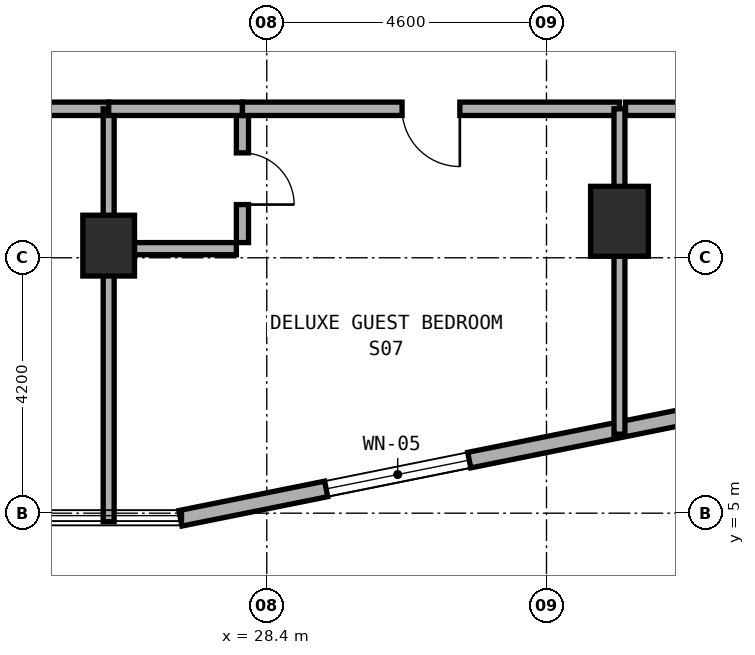
"""IFC4 building model, lengths in metres.
Left out: names, types, materials, properties, quantities, classifications, styles, units other than length and angle.
Written with IfcOpenShell. Run it as: python <this file> out.ifc"""

import sys

from ifc_helpers import new_model, si_unit, direction, frame, frame_2d, origin, origin_2d, place, context, subcontext, project, spatial, rectangle, extrude, element, fill, save


model = new_model("IFC4")
c1 = context("Model", 3, precision=1e-05, world=origin(), true_north=direction((0.0, 1.0)))
c2 = subcontext(c1, "Body", "Model", "MODEL_VIEW")
j1 = project(units=[si_unit("LENGTHUNIT", "METRE"), si_unit("PLANEANGLEUNIT", "RADIAN")], contexts=[c1])
p1 = place(None, origin())
s1 = spatial("IfcSite", under=j1, at=p1, CompositionType="ELEMENT")
p2 = place(p1, origin())
s2 = spatial("IfcBuilding", under=s1, at=p2, CompositionType="ELEMENT")
p3 = place(p2, frame((0.0, 0.0, 127.5)))
s3 = spatial("IfcBuildingStorey", under=s2, at=p3, CompositionType="ELEMENT", Elevation=127.5)
p4 = place(p3, frame((25.8, 9.4, 0.0), z_axis=(0.0, 0.0, 1.0), x_axis=(1.0, 0.0, 0.0)))
e1 = element("IfcColumn", 1, at=p4, inside=s3, PredefinedType="COLUMN", context=c2, shape_type="SweptSolid", body=[
    extrude(rectangle(XDim=0.85, YDim=1.0, at=origin_2d()), origin(), (0.0, 0.0, 1.0), 3.5),
])
p5 = place(p3, frame((34.2, 9.8, 0.0), z_axis=(0.0, 0.0, 1.0), x_axis=(1.0, 0.0, 0.0)))
e2 = element("IfcColumn", 2, at=p5, inside=s3, PredefinedType="COLUMN", context=c2, shape_type="SweptSolid", body=[
    extrude(rectangle(XDim=0.95, YDim=1.15, at=origin_2d()), origin(), (0.0, 0.0, 1.0), 3.5),
])
p6 = place(p3, frame((26.98, 4.916, 0.0), z_axis=(0.0, 0.0, 1.0), x_axis=(0.980315963543, 0.197435082048, 0.0)))
e3 = element("IfcWall", 3, at=p6, inside=s3, PredefinedType="STANDARD", context=c2, shape_type="SweptSolid", body=[
    extrude(rectangle(XDim=9.183, YDim=0.26, at=frame_2d((4.591, 0.0))), origin(), (0.0, 0.0, 1.0), 3.22),
])
p7 = place(p6, frame((2.445, 0.0, 0.8)))
e4 = element("IfcOpeningElement", 4, at=p7, cuts=e3, PredefinedType="OPENING", context=c2, shape_type="SweptSolid", body=[
    extrude(rectangle(XDim=2.4, YDim=1.6, at=frame_2d((1.2, 0.8))), frame((0.0, 0.14, 0.0), z_axis=(0.0, -1.0, 0.0), x_axis=(1.0, 0.0, 0.0)), (0.0, 0.0, 1.0), 0.28),
])
p8 = place(p3, frame((18.4, 11.65, 0.0), z_axis=(0.0, 0.0, 1.0), x_axis=(1.0, 0.0, 0.0)))
e5 = element("IfcWall", 5, at=p8, inside=s3, PredefinedType="SOLIDWALL", context=c2, shape_type="SweptSolid", body=[
    extrude(rectangle(XDim=7.4, YDim=0.22, at=frame_2d((3.7, 0.0))), origin(), (0.0, 0.0, 1.0), 2.695),
])
p9 = place(p8, frame((3.225, 0.0, 0.0)))
e6 = element("IfcOpeningElement", 6, at=p9, cuts=e5, PredefinedType="OPENING", context=c2, shape_type="SweptSolid", body=[
    extrude(rectangle(XDim=0.95, YDim=2.1, at=frame_2d((0.475, 1.05))), frame((0.0, 0.12, 0.0), z_axis=(0.0, -1.0, 0.0), x_axis=(1.0, 0.0, 0.0)), (0.0, 0.0, 1.0), 0.24),
])
p10 = place(p3, frame((25.8, 4.86, 0.0), z_axis=(0.0, 0.0, 1.0), x_axis=(0.0, 1.0, 0.0)))
e7 = element("IfcWall", 7, at=p10, inside=s3, PredefinedType="SOLIDWALL", context=c2, shape_type="SweptSolid", body=[
    extrude(rectangle(XDim=6.79, YDim=0.18, at=frame_2d((3.395, 0.0))), origin(), (0.0, 0.0, 1.0), 2.695),
])
p11 = place(p3, frame((28.0, 9.45, 0.0), z_axis=(0.0, 0.0, 1.0), x_axis=(0.0, 1.0, 0.0)))
e8 = element("IfcWall", 8, at=p11, inside=s3, PredefinedType="PLUMBINGWALL", context=c2, shape_type="SweptSolid", body=[
    extrude(rectangle(XDim=2.1, YDim=0.2, at=frame_2d((1.05, 0.0))), origin(), (0.0, 0.0, 1.0), 2.745),
])
p12 = place(p11, frame((0.625, 0.0, 0.0)))
e9 = element("IfcOpeningElement", 9, at=p12, cuts=e8, PredefinedType="OPENING", context=c2, shape_type="SweptSolid", body=[
    extrude(rectangle(XDim=0.85, YDim=2.1, at=frame_2d((0.425, 1.05))), frame((0.0, 0.11, 0.0), z_axis=(0.0, -1.0, 0.0), x_axis=(1.0, 0.0, 0.0)), (0.0, 0.0, 1.0), 0.22),
])
p13 = place(p3, frame((25.9, 9.35, 0.0), z_axis=(0.0, 0.0, 1.0), x_axis=(1.0, 0.0, 0.0)))
e10 = element("IfcWall", 10, at=p13, inside=s3, PredefinedType="PLUMBINGWALL", context=c2, shape_type="SweptSolid", body=[
    extrude(rectangle(XDim=2.0, YDim=0.2, at=frame_2d((1.0, 0.0))), origin(), (0.0, 0.0, 1.0), 2.835),
])
p14 = place(p3, frame((25.8, 11.65, 0.0), z_axis=(0.0, 0.0, 1.0), x_axis=(1.0, 0.0, 0.0)))
e11 = element("IfcWall", 11, at=p14, inside=s3, PredefinedType="SOLIDWALL", context=c2, shape_type="SweptSolid", body=[
    extrude(rectangle(XDim=2.2, YDim=0.22, at=frame_2d((1.1, 0.0))), origin(), (0.0, 0.0, 1.0), 2.695),
])
p15 = place(p3, frame((28.0, 11.65, 0.0), z_axis=(0.0, 0.0, 1.0), x_axis=(1.0, 0.0, 0.0)))
e12 = element("IfcWall", 12, at=p15, inside=s3, PredefinedType="SOLIDWALL", context=c2, shape_type="SweptSolid", body=[
    extrude(rectangle(XDim=6.2, YDim=0.22, at=frame_2d((3.1, 0.0))), origin(), (0.0, 0.0, 1.0), 2.695),
])
p16 = place(p15, frame((2.625, 0.0, 0.0)))
e13 = element("IfcOpeningElement", 13, at=p16, cuts=e12, PredefinedType="OPENING", context=c2, shape_type="SweptSolid", body=[
    extrude(rectangle(XDim=0.95, YDim=2.1, at=frame_2d((0.475, 1.05))), frame((0.0, 0.12, 0.0), z_axis=(0.0, -1.0, 0.0), x_axis=(1.0, 0.0, 0.0)), (0.0, 0.0, 1.0), 0.24),
])
p17 = place(p3, frame((34.2, 6.299, 0.0), z_axis=(0.0, 0.0, 1.0), x_axis=(0.0, 1.0, 0.0)))
e14 = element("IfcWall", 14, at=p17, inside=s3, PredefinedType="SOLIDWALL", context=c2, shape_type="SweptSolid", body=[
    extrude(rectangle(XDim=5.351, YDim=0.18, at=frame_2d((2.675, 0.0))), origin(), (0.0, 0.0, 1.0), 2.695),
])
p18 = place(p3, frame((34.3, 11.65, 0.0), z_axis=(0.0, 0.0, 1.0), x_axis=(1.0, 0.0, 0.0)))
e15 = element("IfcWall", 15, at=p18, inside=s3, PredefinedType="SOLIDWALL", context=c2, shape_type="SweptSolid", body=[
    extrude(rectangle(XDim=6.64, YDim=0.22, at=frame_2d((3.32, 0.0))), origin(), (0.0, 0.0, 1.0), 2.835),
])
p19 = place(p18, frame((2.55, 0.0, 0.0)))
e16 = element("IfcOpeningElement", 16, at=p19, cuts=e15, PredefinedType="OPENING", context=c2, shape_type="SweptSolid", body=[
    extrude(rectangle(XDim=0.95, YDim=2.1, at=frame_2d((0.475, 1.05))), frame((0.0, 0.12, 0.0), z_axis=(0.0, -1.0, 0.0), x_axis=(1.0, 0.0, 0.0)), (0.0, 0.0, 1.0), 0.24),
])
p20 = place(p7, origin())
e17 = element("IfcWindow", 17, at=p20, inside=s3, PartitioningType="SINGLE_PANEL", PredefinedType="WINDOW", context=c2, shape_type="SweptSolid", body=[
    extrude(rectangle(XDim=2.4, YDim=1.6, at=frame_2d((1.2, 0.8))), frame((0.0, 0.03, 0.0), z_axis=(0.0, -1.0, 0.0), x_axis=(1.0, 0.0, 0.0)), (0.0, 0.0, 1.0), 0.06),
])
fill(e4, e17)
p21 = place(p12, frame((0.85, 0.0, 0.0), z_axis=(0.0, 0.0, 1.0), x_axis=(-1.0, 0.0, 0.0)))
e18 = element("IfcDoor", 18, at=p21, inside=s3, OperationType="SINGLE_SWING_RIGHT", PredefinedType="DOOR", context=c2, shape_type="SweptSolid", body=[
    extrude(rectangle(XDim=0.85, YDim=2.1, at=frame_2d((0.425, 1.05))), frame((0.0, 0.025, 0.0), z_axis=(0.0, -1.0, 0.0), x_axis=(1.0, 0.0, 0.0)), (0.0, 0.0, 1.0), 0.05),
])
fill(e9, e18)
p22 = place(p16, frame((0.95, 0.0, 0.0), z_axis=(0.0, 0.0, 1.0), x_axis=(-1.0, 0.0, 0.0)))
e19 = element("IfcDoor", 19, at=p22, inside=s3, OperationType="SINGLE_SWING_LEFT", PredefinedType="DOOR", context=c2, shape_type="SweptSolid", body=[
    extrude(rectangle(XDim=0.95, YDim=2.1, at=frame_2d((0.475, 1.05))), frame((0.0, 0.025, 0.0), z_axis=(0.0, -1.0, 0.0), x_axis=(1.0, 0.0, 0.0)), (0.0, 0.0, 1.0), 0.05),
])
fill(e13, e19)
save(model, sys.argv[1])
